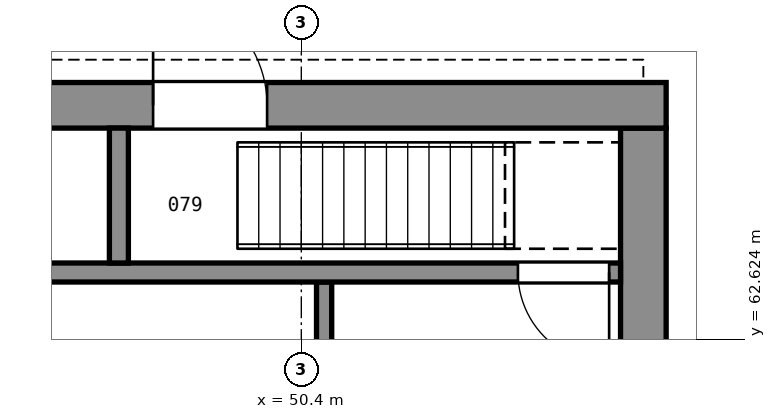
"""IFC4 building model, lengths in metres.
Left out: names, types, materials, properties, quantities, classifications, styles, units other than length and angle.
Written with IfcOpenShell. Run it as: python <this file> out.ifc"""

import sys

from ifc_helpers import new_model, si_unit, direction, frame, frame_2d, origin, place, context, subcontext, project, spatial, rectangle, extrude, element, fill, save


model = new_model("IFC4")
c1 = context("Model", 3, precision=1e-05, world=origin(), true_north=direction((0.0, 1.0)))
c2 = subcontext(c1, "Body", "Model", "MODEL_VIEW")
j1 = project(units=[si_unit("LENGTHUNIT", "METRE"), si_unit("PLANEANGLEUNIT", "RADIAN")], contexts=[c1])
p1 = place(None, origin())
s1 = spatial("IfcSite", under=j1, at=p1, CompositionType="ELEMENT")
p2 = place(p1, origin())
s2 = spatial("IfcBuilding", under=s1, at=p2, CompositionType="ELEMENT")
p3 = place(p2, origin())
s3 = spatial("IfcBuildingStorey", under=s2, at=p3, CompositionType="ELEMENT", Elevation=0.0)
p4 = place(p3, frame((54.9, 43.6, 0.0), z_axis=(0.0, 0.0, 1.0), x_axis=(0.0, 1.0, 0.0)))
e1 = element("IfcWall", 1, at=p4, inside=s3, PredefinedType="SOLIDWALL", context=c2, shape_type="SweptSolid", body=[
    extrude(rectangle(XDim=21.8, YDim=0.6, at=frame_2d((10.9, 0.0))), origin(), (0.0, 0.0, 1.0), 6.0),
])
p5 = place(p3, frame((27.8, 65.7, 0.0), z_axis=(0.0, 0.0, 1.0), x_axis=(1.0, 0.0, 0.0)))
e2 = element("IfcWall", 2, at=p5, inside=s3, PredefinedType="SOLIDWALL", context=c2, shape_type="SweptSolid", body=[
    extrude(rectangle(XDim=27.4, YDim=0.6, at=frame_2d((13.7, 0.0))), origin(), (0.0, 0.0, 1.0), 6.0),
])
p6 = place(p5, frame((2.9, 0.0, 0.0)))
e3 = element("IfcOpeningElement", 3, at=p6, cuts=e2, PredefinedType="OPENING", context=c2, shape_type="SweptSolid", body=[
    extrude(rectangle(XDim=2.2, YDim=2.4, at=frame_2d((1.1, 1.2))), frame((0.0, 0.31, 0.0), z_axis=(0.0, -1.0, 0.0), x_axis=(1.0, 0.0, 0.0)), (0.0, 0.0, 1.0), 0.62),
])
p7 = place(p5, frame((5.3, 0.0, 0.0)))
e4 = element("IfcOpeningElement", 4, at=p7, cuts=e2, PredefinedType="OPENING", context=c2, shape_type="SweptSolid", body=[
    extrude(rectangle(XDim=2.2, YDim=2.4, at=frame_2d((1.1, 1.2))), frame((0.0, 0.31, 0.0), z_axis=(0.0, -1.0, 0.0), x_axis=(1.0, 0.0, 0.0)), (0.0, 0.0, 1.0), 0.62),
])
p8 = place(p5, frame((20.65, 0.0, 0.0)))
e5 = element("IfcOpeningElement", 5, at=p8, cuts=e2, PredefinedType="OPENING", context=c2, shape_type="SweptSolid", body=[
    extrude(rectangle(XDim=1.5, YDim=2.4, at=frame_2d((0.75, 1.2))), frame((0.0, 0.31, 0.0), z_axis=(0.0, -1.0, 0.0), x_axis=(1.0, 0.0, 0.0)), (0.0, 0.0, 1.0), 0.62),
])
p9 = place(p3, frame((50.7, 43.6, 0.0), z_axis=(0.0, 0.0, 1.0), x_axis=(0.0, 1.0, 0.0)))
e6 = element("IfcWall", 6, at=p9, inside=s3, PredefinedType="SOLIDWALL", context=c2, shape_type="SweptSolid", body=[
    extrude(rectangle(XDim=19.775, YDim=0.2, at=frame_2d((9.887, 0.0))), origin(), (0.0, 0.0, 1.0), 2.2),
])
p10 = place(p3, frame((47.0, 63.5, 0.0), z_axis=(0.0, 0.0, 1.0), x_axis=(1.0, 0.0, 0.0)))
e7 = element("IfcWall", 7, at=p10, inside=s3, PredefinedType="SOLIDWALL", context=c2, shape_type="SweptSolid", body=[
    extrude(rectangle(XDim=7.6, YDim=0.25, at=frame_2d((3.8, 0.0))), origin(), (0.0, 0.0, 1.0), 5.0),
])
p11 = place(p10, frame((6.25, 0.0, 2.4)))
e8 = element("IfcOpeningElement", 8, at=p11, cuts=e7, PredefinedType="OPENING", context=c2, shape_type="SweptSolid", body=[
    extrude(rectangle(XDim=1.2, YDim=2.1, at=frame_2d((0.6, 1.05))), frame((0.0, 0.135, 0.0), z_axis=(0.0, -1.0, 0.0), x_axis=(1.0, 0.0, 0.0)), (0.0, 0.0, 1.0), 0.27),
])
p12 = place(p3, frame((48.0, 63.625, 0.0), z_axis=(0.0, 0.0, 1.0), x_axis=(0.0, 1.0, 0.0)))
e9 = element("IfcWall", 9, at=p12, inside=s3, PredefinedType="SOLIDWALL", context=c2, shape_type="SweptSolid", body=[
    extrude(rectangle(XDim=1.775, YDim=0.25, at=frame_2d((0.887, 0.0))), origin(), (0.0, 0.0, 1.0), 5.0),
])
p13 = place(p11, frame((1.2, 0.0, 0.0), z_axis=(0.0, 0.0, 1.0), x_axis=(-1.0, 0.0, 0.0)))
e10 = element("IfcDoor", 10, at=p13, inside=s3, OperationType="SINGLE_SWING_LEFT", PredefinedType="DOOR", context=c2, shape_type="SweptSolid", body=[
    extrude(rectangle(XDim=1.2, YDim=2.1, at=frame_2d((0.6, 1.05))), frame((0.0, 0.025, 0.0), z_axis=(0.0, -1.0, 0.0), x_axis=(1.0, 0.0, 0.0)), (0.0, 0.0, 1.0), 0.05),
])
fill(e8, e10)
p14 = place(p8, origin())
e11 = element("IfcDoor", 11, at=p14, inside=s3, OperationType="SINGLE_SWING_LEFT", PredefinedType="DOOR", context=c2, shape_type="SweptSolid", body=[
    extrude(rectangle(XDim=1.5, YDim=2.4, at=frame_2d((0.75, 1.2))), frame((0.0, 0.025, 0.0), z_axis=(0.0, -1.0, 0.0), x_axis=(1.0, 0.0, 0.0)), (0.0, 0.0, 1.0), 0.05),
])
fill(e5, e11)
save(model, sys.argv[1])
